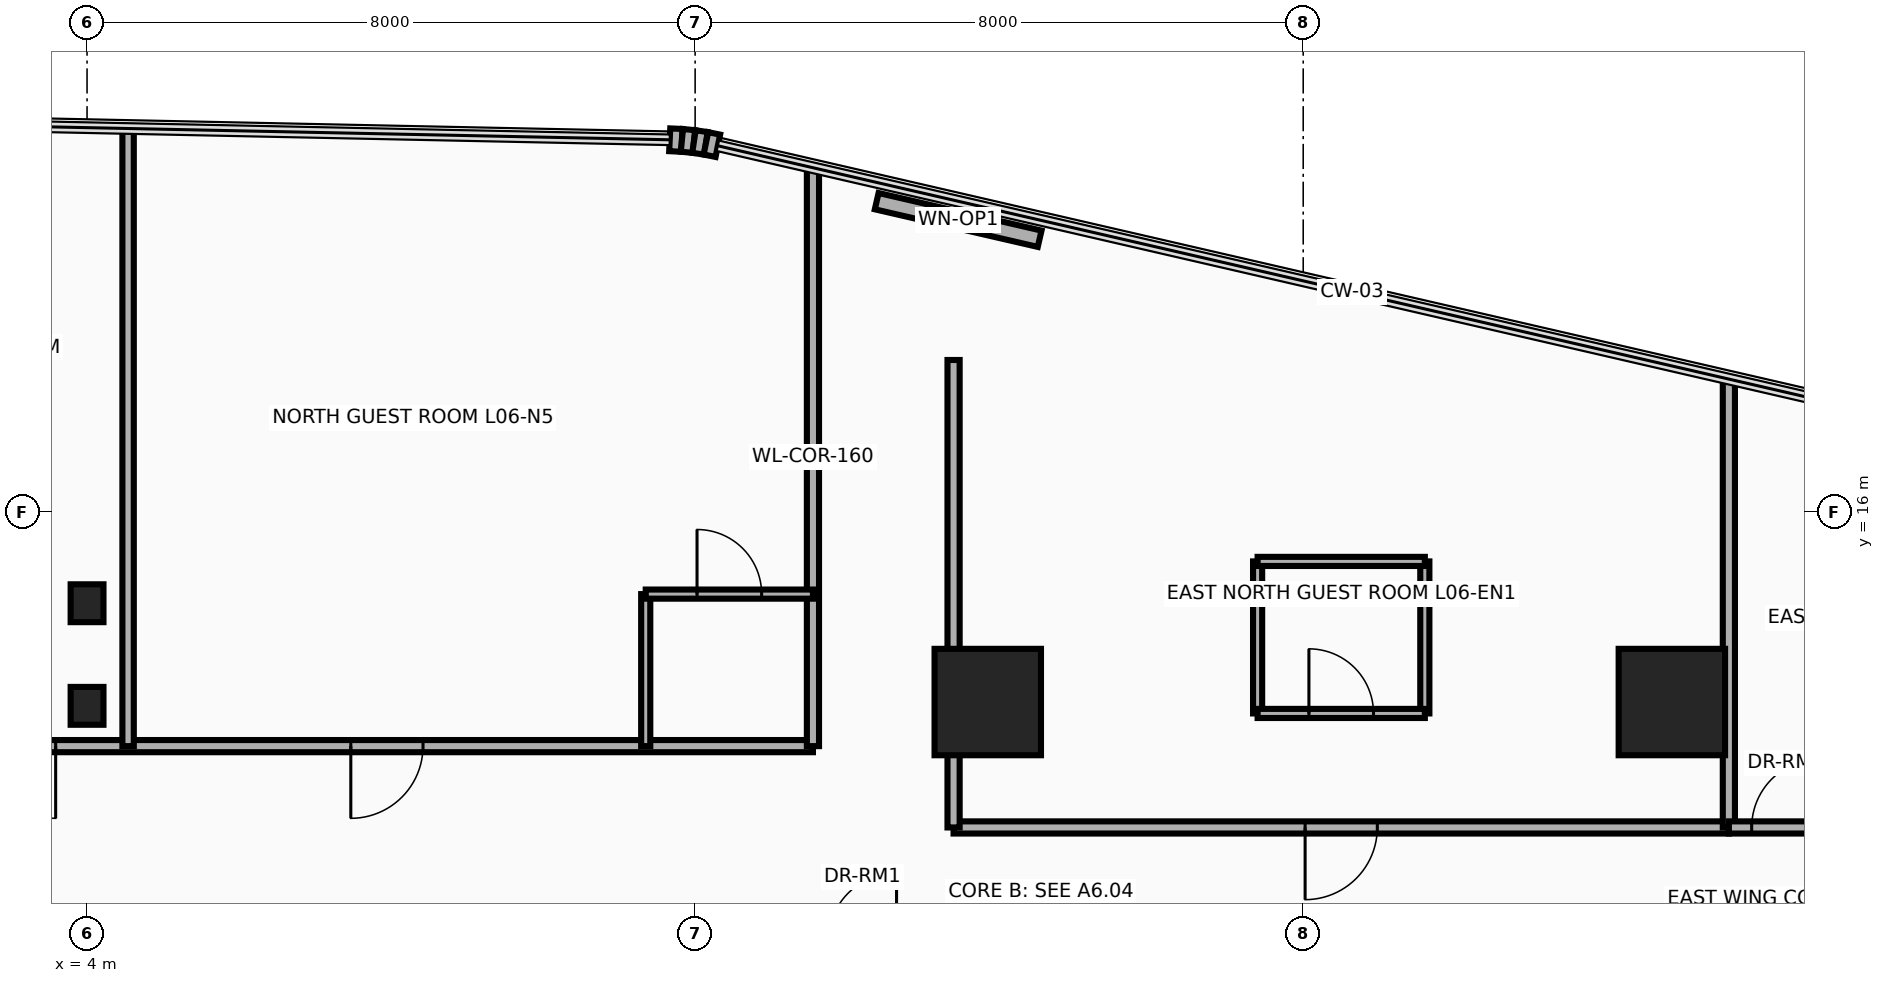
"""IFC4 building model, lengths in metres.
Left out: names, types, materials, properties, quantities, classifications, styles, units other than length and angle.
Written with IfcOpenShell. Run it as: python <this file> out.ifc"""

import sys

from ifc_helpers import new_model, si_unit, direction, frame, frame_2d, origin, origin_2d, place, context, subcontext, project, spatial, rectangle, i_section, extrude, source, transform, mapped, element, fill, save


model = new_model("IFC4")
c1 = context("Model", 3, precision=1e-05, world=origin(), true_north=direction((0.0, 1.0)))
c2 = subcontext(c1, "Body", "Model", "MODEL_VIEW")
j1 = project(units=[si_unit("LENGTHUNIT", "METRE"), si_unit("PLANEANGLEUNIT", "RADIAN")], contexts=[c1])
p1 = place(None, origin())
s1 = spatial("IfcSite", under=j1, at=p1, CompositionType="ELEMENT")
p2 = place(p1, origin())
s2 = spatial("IfcBuilding", under=s1, at=p2, CompositionType="ELEMENT")
p3 = place(p2, frame((0.0, 0.0, 29.7)))
s3 = spatial("IfcBuildingStorey", under=s2, at=p3, CompositionType="ELEMENT", Elevation=29.7)
m1 = source(origin(), c2, "Body", "SweptSolid", [
    extrude(rectangle(XDim=1.4, YDim=1.4, at=origin_2d()), origin(), (0.0, 0.0, 1.0), 3.7),
])
for number, where, z_axis, x_axis in (
    (1, (15.85, 13.5, 0.0), (0.0, 0.0, 1.0), (1.0, 0.0, 0.0)),
    (2, (24.85, 13.5, 0.0), (0.0, 0.0, 1.0), (1.0, 0.0, 0.0)),
):
    element("IfcColumn", number, at=place(p3, frame(where, z_axis=z_axis, x_axis=x_axis)), inside=s3, PredefinedType="COLUMN", context=c2, shape_type="MappedRepresentation", body=[
        mapped(m1, transform((0.0, 0.0, 0.0), x_axis=(1.0, 0.0, 0.0), y_axis=(0.0, 1.0, 0.0), z_axis=(0.0, 0.0, 1.0), scale=1.0)),
    ])
m2 = source(origin(), c2, "Body", "SweptSolid", [
    extrude(i_section(OverallWidth=0.432, OverallDepth=0.498, WebThickness=0.056, FlangeThickness=0.089, at=origin_2d()), origin(), (0.0, 0.0, 1.0), 3.7),
])
for number, where, z_axis, x_axis in (
    (3, (4.0, 13.45, 0.0), (0.0, 0.0, 1.0), (1.0, 0.0, 0.0)),
    (4, (4.0, 14.8, 0.0), (0.0, 0.0, 1.0), (1.0, 0.0, 0.0)),
):
    element("IfcColumn", number, at=place(p3, frame(where, z_axis=z_axis, x_axis=x_axis)), inside=s3, PredefinedType="COLUMN", context=c2, shape_type="MappedRepresentation", body=[
        mapped(m2, transform((0.0, 0.0, 0.0), x_axis=(1.0, 0.0, 0.0), y_axis=(0.0, 1.0, 0.0), z_axis=(0.0, 0.0, 1.0), scale=1.0)),
    ])
p4 = place(p3, frame((11.666, 20.897, 0.0), z_axis=(0.0, 0.0, 1.0), x_axis=(0.998885297239, -0.047203421059, 0.0)))
e5 = element("IfcWall", 5, at=p4, inside=s3, PredefinedType="SOLIDWALL", context=c2, shape_type="SweptSolid", body=[
    extrude(rectangle(XDim=0.16, YDim=0.3, at=frame_2d((0.08, 0.0))), origin(), (0.0, 0.0, 1.0), 3.46),
])
p5 = place(p3, frame((11.826, 20.889, 0.0), z_axis=(0.0, 0.0, 1.0), x_axis=(0.995172891136, -0.098137234257, 0.0)))
e6 = element("IfcWall", 6, at=p5, inside=s3, PredefinedType="SOLIDWALL", context=c2, shape_type="SweptSolid", body=[
    extrude(rectangle(XDim=0.159, YDim=0.3, at=frame_2d((0.08, 0.0))), origin(), (0.0, 0.0, 1.0), 3.46),
])
p6 = place(p3, frame((11.984, 20.874, 0.0), z_axis=(0.0, 0.0, 1.0), x_axis=(0.988846069207, -0.148941100486, 0.0)))
e7 = element("IfcWall", 7, at=p6, inside=s3, PredefinedType="SOLIDWALL", context=c2, shape_type="SweptSolid", body=[
    extrude(rectangle(XDim=0.159, YDim=0.3, at=frame_2d((0.08, 0.0))), origin(), (0.0, 0.0, 1.0), 3.46),
])
p7 = place(p3, frame((12.142, 20.85, 0.0), z_axis=(0.0, 0.0, 1.0), x_axis=(0.979991950448, -0.19903712482, 0.0)))
e8 = element("IfcWall", 8, at=p7, inside=s3, PredefinedType="SOLIDWALL", context=c2, shape_type="SweptSolid", body=[
    extrude(rectangle(XDim=0.161, YDim=0.3, at=frame_2d((0.08, 0.0))), origin(), (0.0, 0.0, 1.0), 3.46),
])
p8 = place(p3, frame((14.389, 20.09, 0.0), z_axis=(0.0, 0.0, 1.0), x_axis=(0.974400545997, -0.224818984875, 0.0)))
e9 = element("IfcWall", 9, at=p8, inside=s3, PredefinedType="SOLIDWALL", context=c2, shape_type="SweptSolid", body=[
    extrude(rectangle(XDim=2.2, YDim=0.22, at=frame_2d((1.1, 0.0))), origin(), (0.0, 0.0, 1.0), 3.46),
])
p9 = place(p8, frame((0.65, 0.0, 0.95)))
e10 = element("IfcOpeningElement", 10, at=p9, cuts=e9, PredefinedType="OPENING", context=c2, shape_type="SweptSolid", body=[
    extrude(rectangle(XDim=0.9, YDim=1.3, at=frame_2d((0.45, 0.65))), frame((0.0, 0.125, 0.0), z_axis=(0.0, -1.0, 0.0), x_axis=(1.0, 0.0, 0.0)), (0.0, 0.0, 1.0), 0.25),
])
p10 = place(p3, frame((-31.89, 12.92, 0.0), z_axis=(0.0, 0.0, 1.0), x_axis=(1.0, 0.0, 0.0)))
e11 = element("IfcWall", 11, at=p10, inside=s3, PredefinedType="PARTITIONING", context=c2, shape_type="SweptSolid", body=[
    extrude(rectangle(XDim=45.44, YDim=0.16, at=frame_2d((22.72, 0.0))), origin(), (0.0, 0.0, 1.0), 2.583),
])
p11 = place(p10, frame((4.225, 0.0, 0.0)))
e12 = element("IfcOpeningElement", 12, at=p11, cuts=e11, PredefinedType="OPENING", context=c2, shape_type="SweptSolid", body=[
    extrude(rectangle(XDim=0.95, YDim=2.15, at=frame_2d((0.475, 1.075))), frame((0.0, 0.095, 0.0), z_axis=(0.0, -1.0, 0.0), x_axis=(1.0, 0.0, 0.0)), (0.0, 0.0, 1.0), 0.19),
])
p12 = place(p10, frame((13.43, 0.0, 0.0)))
e13 = element("IfcOpeningElement", 13, at=p12, cuts=e11, PredefinedType="OPENING", context=c2, shape_type="SweptSolid", body=[
    extrude(rectangle(XDim=0.95, YDim=2.15, at=frame_2d((0.475, 1.075))), frame((0.0, 0.095, 0.0), z_axis=(0.0, -1.0, 0.0), x_axis=(1.0, 0.0, 0.0)), (0.0, 0.0, 1.0), 0.19),
])
p13 = place(p10, frame((20.31, 0.0, 0.0)))
e14 = element("IfcOpeningElement", 14, at=p13, cuts=e11, PredefinedType="OPENING", context=c2, shape_type="SweptSolid", body=[
    extrude(rectangle(XDim=0.95, YDim=2.15, at=frame_2d((0.475, 1.075))), frame((0.0, 0.095, 0.0), z_axis=(0.0, -1.0, 0.0), x_axis=(1.0, 0.0, 0.0)), (0.0, 0.0, 1.0), 0.19),
])
p14 = place(p10, frame((25.517, 0.0, 0.0)))
e15 = element("IfcOpeningElement", 15, at=p14, cuts=e11, PredefinedType="OPENING", context=c2, shape_type="SweptSolid", body=[
    extrude(rectangle(XDim=0.95, YDim=2.15, at=frame_2d((0.475, 1.075))), frame((0.0, 0.095, 0.0), z_axis=(0.0, -1.0, 0.0), x_axis=(1.0, 0.0, 0.0)), (0.0, 0.0, 1.0), 0.19),
])
p15 = place(p10, frame((28.373, 0.0, 0.0)))
e16 = element("IfcOpeningElement", 16, at=p15, cuts=e11, PredefinedType="OPENING", context=c2, shape_type="SweptSolid", body=[
    extrude(rectangle(XDim=0.95, YDim=2.15, at=frame_2d((0.475, 1.075))), frame((0.0, 0.095, 0.0), z_axis=(0.0, -1.0, 0.0), x_axis=(1.0, 0.0, 0.0)), (0.0, 0.0, 1.0), 0.19),
])
p16 = place(p10, frame((34.527, 0.0, 0.0)))
e17 = element("IfcOpeningElement", 17, at=p16, cuts=e11, PredefinedType="OPENING", context=c2, shape_type="SweptSolid", body=[
    extrude(rectangle(XDim=0.95, YDim=2.15, at=frame_2d((0.475, 1.075))), frame((0.0, 0.095, 0.0), z_axis=(0.0, -1.0, 0.0), x_axis=(1.0, 0.0, 0.0)), (0.0, 0.0, 1.0), 0.19),
])
p17 = place(p10, frame((39.36, 0.0, 0.0)))
e18 = element("IfcOpeningElement", 18, at=p17, cuts=e11, PredefinedType="OPENING", context=c2, shape_type="SweptSolid", body=[
    extrude(rectangle(XDim=0.95, YDim=2.15, at=frame_2d((0.475, 1.075))), frame((0.0, 0.095, 0.0), z_axis=(0.0, -1.0, 0.0), x_axis=(1.0, 0.0, 0.0)), (0.0, 0.0, 1.0), 0.19),
])
p18 = place(p3, frame((13.55, 12.92, 0.0), z_axis=(0.0, 0.0, 1.0), x_axis=(0.0, 1.0, 0.0)))
e19 = element("IfcWall", 19, at=p18, inside=s3, PredefinedType="PARTITIONING", context=c2, shape_type="SweptSolid", body=[
    extrude(rectangle(XDim=7.609, YDim=0.16, at=frame_2d((3.805, 0.0))), origin(), (0.0, 0.0, 1.0), 2.583),
])
p19 = place(p3, frame((4.54, 12.92, 0.0), z_axis=(0.0, 0.0, 1.0), x_axis=(0.0, 1.0, 0.0)))
e20 = element("IfcWall", 20, at=p19, inside=s3, PredefinedType="PARTITIONING", context=c2, shape_type="SweptSolid", body=[
    extrude(rectangle(XDim=8.125, YDim=0.15, at=frame_2d((4.063, 0.0))), origin(), (0.0, 0.0, 1.0), 2.583),
])
p20 = place(p3, frame((11.35, 12.92, 0.0), z_axis=(0.0, 0.0, 1.0), x_axis=(0.0, 1.0, 0.0)))
e21 = element("IfcWall", 21, at=p20, inside=s3, PredefinedType="PARTITIONING", context=c2, shape_type="SweptSolid", body=[
    extrude(rectangle(XDim=2.0, YDim=0.12, at=frame_2d((1.0, 0.0))), origin(), (0.0, 0.0, 1.0), 2.583),
])
p21 = place(p3, frame((11.35, 14.92, 0.0), z_axis=(0.0, 0.0, 1.0), x_axis=(1.0, 0.0, 0.0)))
e22 = element("IfcWall", 22, at=p21, inside=s3, PredefinedType="PARTITIONING", context=c2, shape_type="SweptSolid", body=[
    extrude(rectangle(XDim=2.2, YDim=0.12, at=frame_2d((1.1, 0.0))), origin(), (0.0, 0.0, 1.0), 3.46),
])
p22 = place(p21, frame((0.675, 0.0, 0.0)))
e23 = element("IfcOpeningElement", 23, at=p22, cuts=e22, PredefinedType="OPENING", context=c2, shape_type="SweptSolid", body=[
    extrude(rectangle(XDim=0.85, YDim=2.1, at=frame_2d((0.425, 1.05))), frame((0.0, 0.075, 0.0), z_axis=(0.0, -1.0, 0.0), x_axis=(1.0, 0.0, 0.0)), (0.0, 0.0, 1.0), 0.15),
])
p23 = place(p3, frame((15.4, 11.85, 0.0), z_axis=(0.0, 0.0, 1.0), x_axis=(1.0, 0.0, 0.0)))
e24 = element("IfcWall", 24, at=p23, inside=s3, PredefinedType="PARTITIONING", context=c2, shape_type="SweptSolid", body=[
    extrude(rectangle(XDim=10.2, YDim=0.16, at=frame_2d((5.1, 0.0))), origin(), (0.0, 0.0, 1.0), 2.834),
])
p24 = place(p23, frame((4.625, 0.0, 0.0)))
e25 = element("IfcOpeningElement", 25, at=p24, cuts=e24, PredefinedType="OPENING", context=c2, shape_type="SweptSolid", body=[
    extrude(rectangle(XDim=0.95, YDim=2.15, at=frame_2d((0.475, 1.075))), frame((0.0, 0.095, 0.0), z_axis=(0.0, -1.0, 0.0), x_axis=(1.0, 0.0, 0.0)), (0.0, 0.0, 1.0), 0.19),
])
p25 = place(p3, frame((15.4, 11.85, 0.0), z_axis=(0.0, 0.0, 1.0), x_axis=(0.0, 1.0, 0.0)))
e26 = element("IfcWall", 26, at=p25, inside=s3, PredefinedType="PARTITIONING", context=c2, shape_type="SweptSolid", body=[
    extrude(rectangle(XDim=6.15, YDim=0.16, at=frame_2d((3.075, 0.0))), origin(), (0.0, 0.0, 1.0), 2.583),
])
p26 = place(p3, frame((25.6, 11.85, 0.0), z_axis=(0.0, 0.0, 1.0), x_axis=(0.0, 1.0, 0.0)))
e27 = element("IfcWall", 27, at=p26, inside=s3, PredefinedType="PARTITIONING", context=c2, shape_type="SweptSolid", body=[
    extrude(rectangle(XDim=5.898, YDim=0.16, at=frame_2d((2.949, 0.0))), origin(), (0.0, 0.0, 1.0), 2.583),
])
for number, where, z_axis, x_axis in (
    (28, (19.4, 13.35, 0.0), (0.0, 0.0, 1.0), (0.0, 1.0, 0.0)),
    (29, (21.6, 13.35, 0.0), (0.0, 0.0, 1.0), (0.0, 1.0, 0.0)),
):
    element("IfcWall", number, at=place(p3, frame(where, z_axis=z_axis, x_axis=x_axis)), inside=s3, PredefinedType="PARTITIONING", context=c2, shape_type="SweptSolid", body=[
        extrude(rectangle(XDim=2.0, YDim=0.12, at=frame_2d((1.0, 0.0))), origin(), (0.0, 0.0, 1.0), 2.583),
    ])
p27 = place(p3, frame((19.4, 15.35, 0.0), z_axis=(0.0, 0.0, 1.0), x_axis=(1.0, 0.0, 0.0)))
e30 = element("IfcWall", 30, at=p27, inside=s3, PredefinedType="PARTITIONING", context=c2, shape_type="SweptSolid", body=[
    extrude(rectangle(XDim=2.2, YDim=0.12, at=frame_2d((1.1, 0.0))), origin(), (0.0, 0.0, 1.0), 3.46),
])
p28 = place(p3, frame((19.4, 13.35, 0.0), z_axis=(0.0, 0.0, 1.0), x_axis=(1.0, 0.0, 0.0)))
e31 = element("IfcWall", 31, at=p28, inside=s3, PredefinedType="PARTITIONING", context=c2, shape_type="SweptSolid", body=[
    extrude(rectangle(XDim=2.2, YDim=0.12, at=frame_2d((1.1, 0.0))), origin(), (0.0, 0.0, 1.0), 2.583),
])
p29 = place(p28, frame((0.675, 0.0, 0.0)))
e32 = element("IfcOpeningElement", 32, at=p29, cuts=e31, PredefinedType="OPENING", context=c2, shape_type="SweptSolid", body=[
    extrude(rectangle(XDim=0.85, YDim=2.1, at=frame_2d((0.425, 1.05))), frame((0.0, 0.075, 0.0), z_axis=(0.0, -1.0, 0.0), x_axis=(1.0, 0.0, 0.0)), (0.0, 0.0, 1.0), 0.15),
])
p30 = place(p3, frame((25.6, 11.85, 0.0), z_axis=(0.0, 0.0, 1.0), x_axis=(1.0, 0.0, 0.0)))
e33 = element("IfcWall", 33, at=p30, inside=s3, PredefinedType="PARTITIONING", context=c2, shape_type="SweptSolid", body=[
    extrude(rectangle(XDim=5.79, YDim=0.16, at=frame_2d((2.895, 0.0))), origin(), (0.0, 0.0, 1.0), 2.896),
])
p31 = place(p30, frame((0.3, 0.0, 0.0)))
e34 = element("IfcOpeningElement", 34, at=p31, cuts=e33, PredefinedType="OPENING", context=c2, shape_type="SweptSolid", body=[
    extrude(rectangle(XDim=0.9, YDim=2.1, at=frame_2d((0.45, 1.05))), frame((0.0, 0.095, 0.0), z_axis=(0.0, -1.0, 0.0), x_axis=(1.0, 0.0, 0.0)), (0.0, 0.0, 1.0), 0.19),
])
p32 = place(p9, origin())
e35 = element("IfcWindow", 35, at=p32, inside=s3, PartitioningType="SINGLE_PANEL", PredefinedType="WINDOW", context=c2, shape_type="SweptSolid", body=[
    extrude(rectangle(XDim=0.9, YDim=1.3, at=frame_2d((0.45, 0.65))), frame((0.0, 0.03, 0.0), z_axis=(0.0, -1.0, 0.0), x_axis=(1.0, 0.0, 0.0)), (0.0, 0.0, 1.0), 0.06),
])
fill(e10, e35)
p33 = place(p16, frame((0.95, 0.0, 0.0), z_axis=(0.0, 0.0, 1.0), x_axis=(-1.0, 0.0, 0.0)))
e36 = element("IfcDoor", 36, at=p33, inside=s3, OperationType="SINGLE_SWING_LEFT", PredefinedType="DOOR", context=c2, shape_type="SweptSolid", body=[
    extrude(rectangle(XDim=0.95, YDim=2.15, at=frame_2d((0.475, 1.075))), frame((0.0, 0.025, 0.0), z_axis=(0.0, -1.0, 0.0), x_axis=(1.0, 0.0, 0.0)), (0.0, 0.0, 1.0), 0.05),
])
fill(e17, e36)
p34 = place(p17, frame((0.95, 0.0, 0.0), z_axis=(0.0, 0.0, 1.0), x_axis=(-1.0, 0.0, 0.0)))
e37 = element("IfcDoor", 37, at=p34, inside=s3, OperationType="SINGLE_SWING_LEFT", PredefinedType="DOOR", context=c2, shape_type="SweptSolid", body=[
    extrude(rectangle(XDim=0.95, YDim=2.15, at=frame_2d((0.475, 1.075))), frame((0.0, 0.025, 0.0), z_axis=(0.0, -1.0, 0.0), x_axis=(1.0, 0.0, 0.0)), (0.0, 0.0, 1.0), 0.05),
])
fill(e18, e37)
p35 = place(p22, origin())
e38 = element("IfcDoor", 38, at=p35, inside=s3, OperationType="SINGLE_SWING_RIGHT", PredefinedType="DOOR", context=c2, shape_type="SweptSolid", body=[
    extrude(rectangle(XDim=0.85, YDim=2.1, at=frame_2d((0.425, 1.05))), frame((0.0, 0.025, 0.0), z_axis=(0.0, -1.0, 0.0), x_axis=(1.0, 0.0, 0.0)), (0.0, 0.0, 1.0), 0.05),
])
fill(e23, e38)
p36 = place(p24, frame((0.95, 0.0, 0.0), z_axis=(0.0, 0.0, 1.0), x_axis=(-1.0, 0.0, 0.0)))
e39 = element("IfcDoor", 39, at=p36, inside=s3, OperationType="SINGLE_SWING_LEFT", PredefinedType="DOOR", context=c2, shape_type="SweptSolid", body=[
    extrude(rectangle(XDim=0.95, YDim=2.15, at=frame_2d((0.475, 1.075))), frame((0.0, 0.025, 0.0), z_axis=(0.0, -1.0, 0.0), x_axis=(1.0, 0.0, 0.0)), (0.0, 0.0, 1.0), 0.05),
])
fill(e25, e39)
p37 = place(p29, origin())
e40 = element("IfcDoor", 40, at=p37, inside=s3, OperationType="SINGLE_SWING_RIGHT", PredefinedType="DOOR", context=c2, shape_type="SweptSolid", body=[
    extrude(rectangle(XDim=0.85, YDim=2.1, at=frame_2d((0.425, 1.05))), frame((0.0, 0.025, 0.0), z_axis=(0.0, -1.0, 0.0), x_axis=(1.0, 0.0, 0.0)), (0.0, 0.0, 1.0), 0.05),
])
fill(e32, e40)
p38 = place(p31, origin())
e41 = element("IfcDoor", 41, at=p38, inside=s3, OperationType="SINGLE_SWING_LEFT", PredefinedType="DOOR", context=c2, shape_type="SweptSolid", body=[
    extrude(rectangle(XDim=0.9, YDim=2.1, at=frame_2d((0.45, 1.05))), frame((0.0, 0.025, 0.0), z_axis=(0.0, -1.0, 0.0), x_axis=(1.0, 0.0, 0.0)), (0.0, 0.0, 1.0), 0.05),
])
fill(e34, e41)
save(model, sys.argv[1])
